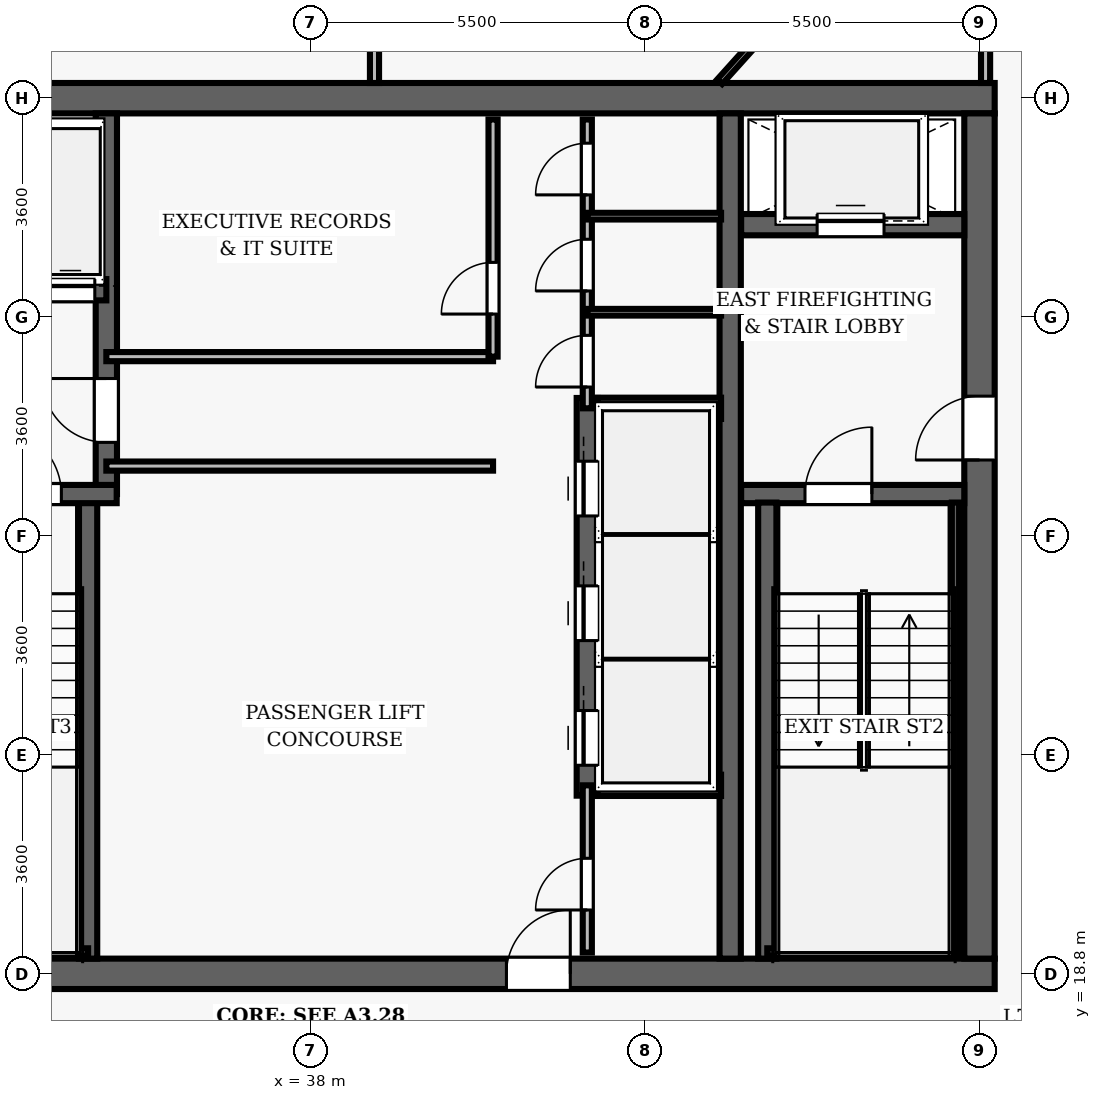
"""IFC4 building model, lengths in metres.
Left out: names, types, materials, properties, quantities, classifications, styles, units other than length and angle.
Written with IfcOpenShell. Run it as: python <this file> out.ifc"""

import sys

from ifc_helpers import new_model, si_unit, direction, frame, frame_2d, origin, place, context, subcontext, project, spatial, rectangle, extrude, element, fill, save


model = new_model("IFC4")
c1 = context("Model", 3, precision=1e-05, world=origin(), true_north=direction((0.0, 1.0)))
c2 = subcontext(c1, "Body", "Model", "MODEL_VIEW")
j1 = project(units=[si_unit("LENGTHUNIT", "METRE"), si_unit("PLANEANGLEUNIT", "RADIAN")], contexts=[c1])
p1 = place(None, origin())
s1 = spatial("IfcSite", under=j1, at=p1, CompositionType="ELEMENT")
p2 = place(p1, origin())
s2 = spatial("IfcBuilding", under=s1, at=p2, CompositionType="ELEMENT")
p3 = place(p2, frame((0.0, 0.0, 280.55)))
s3 = spatial("IfcBuildingStorey", under=s2, at=p3, CompositionType="ELEMENT", Elevation=280.55)
p4 = place(p3, frame((26.75, 18.8, 0.0), z_axis=(0.0, 0.0, 1.0), x_axis=(1.0, 0.0, 0.0)))
e1 = element("IfcWall", 1, at=p4, inside=s3, PredefinedType="SHEAR", context=c2, shape_type="SweptSolid", body=[
    extrude(rectangle(XDim=22.5, YDim=0.5, at=frame_2d((11.25, 0.0))), origin(), (0.0, 0.0, 1.0), 3.85),
])
p5 = place(p4, frame((14.47, 0.0, 0.0)))
e2 = element("IfcOpeningElement", 2, at=p5, cuts=e1, PredefinedType="OPENING", context=c2, shape_type="SweptSolid", body=[
    extrude(rectangle(XDim=1.05, YDim=2.15, at=frame_2d((0.525, 1.075))), frame((0.0, 0.26, 0.0), z_axis=(0.0, -1.0, 0.0), x_axis=(1.0, 0.0, 0.0)), (0.0, 0.0, 1.0), 0.52),
])
p6 = place(p3, frame((26.75, 33.2, 0.0), z_axis=(0.0, 0.0, 1.0), x_axis=(1.0, 0.0, 0.0)))
e3 = element("IfcWall", 3, at=p6, inside=s3, PredefinedType="SHEAR", context=c2, shape_type="SweptSolid", body=[
    extrude(rectangle(XDim=22.5, YDim=0.5, at=frame_2d((11.25, 0.0))), origin(), (0.0, 0.0, 1.0), 3.85),
])
p7 = place(p3, frame((49.0, 19.05, 0.0), z_axis=(0.0, 0.0, 1.0), x_axis=(0.0, 1.0, 0.0)))
e4 = element("IfcWall", 4, at=p7, inside=s3, PredefinedType="SHEAR", context=c2, shape_type="SweptSolid", body=[
    extrude(rectangle(XDim=13.9, YDim=0.5, at=frame_2d((6.95, 0.0))), origin(), (0.0, 0.0, 1.0), 3.85),
])
p8 = place(p7, frame((8.2, 0.0, 0.0)))
e5 = element("IfcOpeningElement", 5, at=p8, cuts=e4, PredefinedType="OPENING", context=c2, shape_type="SweptSolid", body=[
    extrude(rectangle(XDim=1.05, YDim=2.15, at=frame_2d((0.525, 1.075))), frame((0.0, 0.26, 0.0), z_axis=(0.0, -1.0, 0.0), x_axis=(1.0, 0.0, 0.0)), (0.0, 0.0, 1.0), 0.52),
])
p9 = place(p3, frame((44.9, 19.05, 0.0), z_axis=(0.0, 0.0, 1.0), x_axis=(0.0, 1.0, 0.0)))
e6 = element("IfcWall", 6, at=p9, inside=s3, PredefinedType="SHEAR", context=c2, shape_type="SweptSolid", body=[
    extrude(rectangle(XDim=13.9, YDim=0.35, at=frame_2d((6.95, 0.0))), origin(), (0.0, 0.0, 1.0), 3.85),
])
p10 = place(p3, frame((45.08, 26.69, 0.0), z_axis=(0.0, 0.0, 1.0), x_axis=(1.0, 0.0, 0.0)))
e7 = element("IfcWall", 7, at=p10, inside=s3, PredefinedType="SHEAR", context=c2, shape_type="SweptSolid", body=[
    extrude(rectangle(XDim=3.67, YDim=0.3, at=frame_2d((1.835, 0.0))), origin(), (0.0, 0.0, 1.0), 3.85),
])
p11 = place(p10, frame((1.05, 0.0, 0.0)))
e8 = element("IfcOpeningElement", 8, at=p11, cuts=e7, PredefinedType="OPENING", context=c2, shape_type="SweptSolid", body=[
    extrude(rectangle(XDim=1.1, YDim=2.15, at=frame_2d((0.55, 1.075))), frame((0.0, 0.16, 0.0), z_axis=(0.0, -1.0, 0.0), x_axis=(1.0, 0.0, 0.0)), (0.0, 0.0, 1.0), 0.32),
])
p12 = place(p3, frame((45.51, 19.05, 0.0), z_axis=(0.0, 0.0, 1.0), x_axis=(0.0, 1.0, 0.0)))
e9 = element("IfcWall", 9, at=p12, inside=s3, PredefinedType="SHEAR", context=c2, shape_type="SweptSolid", body=[
    extrude(rectangle(XDim=7.5, YDim=0.3, at=frame_2d((3.75, 0.0))), origin(), (0.0, 0.0, 1.0), 3.85),
])
p13 = place(p3, frame((48.605, 19.1, 0.0), z_axis=(0.0, 0.0, 1.0), x_axis=(0.0, 1.0, 0.0)))
e10 = element("IfcWall", 10, at=p13, inside=s3, PredefinedType="SHEAR", context=c2, shape_type="SweptSolid", body=[
    extrude(rectangle(XDim=7.45, YDim=0.12, at=frame_2d((3.725, 0.0))), origin(), (0.0, 0.0, 1.0), 3.85),
])
p14 = place(p3, frame((45.51, 19.16, 0.0), z_axis=(0.0, 0.0, 1.0), x_axis=(1.0, 0.0, 0.0)))
e11 = element("IfcWall", 11, at=p14, inside=s3, PredefinedType="SHEAR", context=c2, shape_type="SweptSolid", body=[
    extrude(rectangle(XDim=3.095, YDim=0.12, at=frame_2d((1.547, 0.0))), origin(), (0.0, 0.0, 1.0), 3.85),
])
p15 = place(p3, frame((45.08, 31.12, 0.0), z_axis=(0.0, 0.0, 1.0), x_axis=(1.0, 0.0, 0.0)))
e12 = element("IfcWall", 12, at=p15, inside=s3, PredefinedType="SHEAR", context=c2, shape_type="SweptSolid", body=[
    extrude(rectangle(XDim=3.67, YDim=0.35, at=frame_2d((1.835, 0.0))), origin(), (0.0, 0.0, 1.0), 3.04),
])
p16 = place(p15, frame((1.25, 0.0, 0.0)))
e13 = element("IfcOpeningElement", 13, at=p16, cuts=e12, PredefinedType="OPENING", context=c2, shape_type="SweptSolid", body=[
    extrude(rectangle(XDim=1.1, YDim=2.15, at=frame_2d((0.55, 1.075))), frame((0.0, 0.185, 0.0), z_axis=(0.0, -1.0, 0.0), x_axis=(1.0, 0.0, 0.0)), (0.0, 0.0, 1.0), 0.37),
])
p17 = place(p3, frame((34.34, 19.05, 0.0), z_axis=(0.0, 0.0, 1.0), x_axis=(0.0, 1.0, 0.0)))
e14 = element("IfcWall", 14, at=p17, inside=s3, PredefinedType="SHEAR", context=c2, shape_type="SweptSolid", body=[
    extrude(rectangle(XDim=7.5, YDim=0.3, at=frame_2d((3.75, 0.0))), origin(), (0.0, 0.0, 1.0), 3.85),
])
p18 = place(p3, frame((34.64, 26.69, 0.0), z_axis=(0.0, 0.0, 1.0), x_axis=(0.0, 1.0, 0.0)))
e15 = element("IfcWall", 15, at=p18, inside=s3, PredefinedType="SHEAR", context=c2, shape_type="SweptSolid", body=[
    extrude(rectangle(XDim=6.26, YDim=0.35, at=frame_2d((3.13, 0.0))), origin(), (0.0, 0.0, 1.0), 3.85),
])
p19 = place(p18, frame((0.85, 0.0, 0.0)))
e16 = element("IfcOpeningElement", 16, at=p19, cuts=e15, PredefinedType="OPENING", context=c2, shape_type="SweptSolid", body=[
    extrude(rectangle(XDim=1.05, YDim=2.15, at=frame_2d((0.525, 1.075))), frame((0.0, 0.185, 0.0), z_axis=(0.0, -1.0, 0.0), x_axis=(1.0, 0.0, 0.0)), (0.0, 0.0, 1.0), 0.37),
])
p20 = place(p3, frame((31.25, 26.69, 0.0), z_axis=(0.0, 0.0, 1.0), x_axis=(1.0, 0.0, 0.0)))
e17 = element("IfcWall", 17, at=p20, inside=s3, PredefinedType="SHEAR", context=c2, shape_type="SweptSolid", body=[
    extrude(rectangle(XDim=3.56, YDim=0.3, at=frame_2d((1.78, 0.0))), origin(), (0.0, 0.0, 1.0), 3.85),
])
p21 = place(p20, frame((1.55, 0.0, 0.0)))
e18 = element("IfcOpeningElement", 18, at=p21, cuts=e17, PredefinedType="OPENING", context=c2, shape_type="SweptSolid", body=[
    extrude(rectangle(XDim=1.1, YDim=2.15, at=frame_2d((0.55, 1.075))), frame((0.0, 0.16, 0.0), z_axis=(0.0, -1.0, 0.0), x_axis=(1.0, 0.0, 0.0)), (0.0, 0.0, 1.0), 0.32),
])
p22 = place(p3, frame((31.3, 19.16, 0.0), z_axis=(0.0, 0.0, 1.0), x_axis=(1.0, 0.0, 0.0)))
e19 = element("IfcWall", 19, at=p22, inside=s3, PredefinedType="SHEAR", context=c2, shape_type="SweptSolid", body=[
    extrude(rectangle(XDim=3.04, YDim=0.12, at=frame_2d((1.52, 0.0))), origin(), (0.0, 0.0, 1.0), 3.85),
])
p23 = place(p3, frame((32.23, 30.05, 0.0), z_axis=(0.0, 0.0, 1.0), x_axis=(1.0, 0.0, 0.0)))
e20 = element("IfcWall", 20, at=p23, inside=s3, PredefinedType="SHEAR", context=c2, shape_type="SweptSolid", body=[
    extrude(rectangle(XDim=2.41, YDim=0.35, at=frame_2d((1.205, 0.0))), origin(), (0.0, 0.0, 1.0), 3.04),
])
p24 = place(p23, frame((0.42, 0.0, 0.0)))
e21 = element("IfcOpeningElement", 21, at=p24, cuts=e20, PredefinedType="OPENING", context=c2, shape_type="SweptSolid", body=[
    extrude(rectangle(XDim=0.8, YDim=2.15, at=frame_2d((0.4, 1.075))), frame((0.0, 0.185, 0.0), z_axis=(0.0, -1.0, 0.0), x_axis=(1.0, 0.0, 0.0)), (0.0, 0.0, 1.0), 0.37),
])
p25 = place(p23, frame((1.42, 0.0, 0.0)))
e22 = element("IfcOpeningElement", 22, at=p25, cuts=e20, PredefinedType="OPENING", context=c2, shape_type="SweptSolid", body=[
    extrude(rectangle(XDim=0.8, YDim=2.15, at=frame_2d((0.4, 1.075))), frame((0.0, 0.185, 0.0), z_axis=(0.0, -1.0, 0.0), x_axis=(1.0, 0.0, 0.0)), (0.0, 0.0, 1.0), 0.37),
])
p26 = place(p3, frame((42.55, 21.73, 0.0), z_axis=(0.0, 0.0, 1.0), x_axis=(0.0, 1.0, 0.0)))
e23 = element("IfcWall", 23, at=p26, inside=s3, PredefinedType="SHEAR", context=c2, shape_type="SweptSolid", body=[
    extrude(rectangle(XDim=6.54, YDim=0.35, at=frame_2d((3.27, 0.0))), origin(), (0.0, 0.0, 1.0), 3.04),
])
p27 = place(p26, frame((0.5, 0.0, 0.0)))
e24 = element("IfcOpeningElement", 24, at=p27, cuts=e23, PredefinedType="OPENING", context=c2, shape_type="SweptSolid", body=[
    extrude(rectangle(XDim=0.9, YDim=2.15, at=frame_2d((0.45, 1.075))), frame((0.0, 0.185, 0.0), z_axis=(0.0, -1.0, 0.0), x_axis=(1.0, 0.0, 0.0)), (0.0, 0.0, 1.0), 0.37),
])
p28 = place(p26, frame((2.55, 0.0, 0.0)))
e25 = element("IfcOpeningElement", 25, at=p28, cuts=e23, PredefinedType="OPENING", context=c2, shape_type="SweptSolid", body=[
    extrude(rectangle(XDim=0.9, YDim=2.15, at=frame_2d((0.45, 1.075))), frame((0.0, 0.185, 0.0), z_axis=(0.0, -1.0, 0.0), x_axis=(1.0, 0.0, 0.0)), (0.0, 0.0, 1.0), 0.37),
])
p29 = place(p26, frame((4.6, 0.0, 0.0)))
e26 = element("IfcOpeningElement", 26, at=p29, cuts=e23, PredefinedType="OPENING", context=c2, shape_type="SweptSolid", body=[
    extrude(rectangle(XDim=0.9, YDim=2.15, at=frame_2d((0.45, 1.075))), frame((0.0, 0.185, 0.0), z_axis=(0.0, -1.0, 0.0), x_axis=(1.0, 0.0, 0.0)), (0.0, 0.0, 1.0), 0.37),
])
for number, where, z_axis, x_axis in (
    (27, (42.72, 21.9, 0.0), (0.0, 0.0, 1.0), (1.0, 0.0, 0.0)),
    (28, (42.72, 28.1, 0.0), (0.0, 0.0, 1.0), (1.0, 0.0, 0.0)),
):
    element("IfcWall", number, at=place(p3, frame(where, z_axis=z_axis, x_axis=x_axis)), inside=s3, PredefinedType="SHEAR", context=c2, shape_type="SweptSolid", body=[
        extrude(rectangle(XDim=2.03, YDim=0.35, at=frame_2d((1.015, 0.0))), origin(), (0.0, 0.0, 1.0), 3.04),
    ])
for number, where, z_axis, x_axis in (
    (29, (34.64, 27.15, 0.0), (0.0, 0.0, 1.0), (1.0, 0.0, 0.0)),
    (30, (34.64, 28.95, 0.0), (0.0, 0.0, 1.0), (1.0, 0.0, 0.0)),
):
    element("IfcWall", number, at=place(p3, frame(where, z_axis=z_axis, x_axis=x_axis)), inside=s3, PredefinedType="PARTITIONING", context=c2, shape_type="SweptSolid", body=[
        extrude(rectangle(XDim=6.36, YDim=0.15, at=frame_2d((3.18, 0.0))), origin(), (0.0, 0.0, 1.0), 3.04),
    ])
p30 = place(p3, frame((41.0, 28.95, 0.0), z_axis=(0.0, 0.0, 1.0), x_axis=(0.0, 1.0, 0.0)))
e31 = element("IfcWall", 31, at=p30, inside=s3, PredefinedType="PARTITIONING", context=c2, shape_type="SweptSolid", body=[
    extrude(rectangle(XDim=3.9, YDim=0.15, at=frame_2d((1.95, 0.0))), origin(), (0.0, 0.0, 1.0), 3.04),
])
p31 = place(p30, frame((0.7, 0.0, 0.0)))
e32 = element("IfcOpeningElement", 32, at=p31, cuts=e31, PredefinedType="OPENING", context=c2, shape_type="SweptSolid", body=[
    extrude(rectangle(XDim=0.85, YDim=2.1, at=frame_2d((0.425, 1.05))), frame((0.0, 0.085, 0.0), z_axis=(0.0, -1.0, 0.0), x_axis=(1.0, 0.0, 0.0)), (0.0, 0.0, 1.0), 0.17),
])
p32 = place(p3, frame((42.55, 28.1, 0.0), z_axis=(0.0, 0.0, 1.0), x_axis=(0.0, 1.0, 0.0)))
e33 = element("IfcWall", 33, at=p32, inside=s3, PredefinedType="PARTITIONING", context=c2, shape_type="SweptSolid", body=[
    extrude(rectangle(XDim=4.75, YDim=0.15, at=frame_2d((2.375, 0.0))), origin(), (0.0, 0.0, 1.0), 3.04),
])
p33 = place(p32, frame((0.35, 0.0, 0.0)))
e34 = element("IfcOpeningElement", 34, at=p33, cuts=e33, PredefinedType="OPENING", context=c2, shape_type="SweptSolid", body=[
    extrude(rectangle(XDim=0.85, YDim=2.1, at=frame_2d((0.425, 1.05))), frame((0.0, 0.085, 0.0), z_axis=(0.0, -1.0, 0.0), x_axis=(1.0, 0.0, 0.0)), (0.0, 0.0, 1.0), 0.17),
])
p34 = place(p32, frame((1.93, 0.0, 0.0)))
e35 = element("IfcOpeningElement", 35, at=p34, cuts=e33, PredefinedType="OPENING", context=c2, shape_type="SweptSolid", body=[
    extrude(rectangle(XDim=0.85, YDim=2.1, at=frame_2d((0.425, 1.05))), frame((0.0, 0.085, 0.0), z_axis=(0.0, -1.0, 0.0), x_axis=(1.0, 0.0, 0.0)), (0.0, 0.0, 1.0), 0.17),
])
p35 = place(p32, frame((3.51, 0.0, 0.0)))
e36 = element("IfcOpeningElement", 36, at=p35, cuts=e33, PredefinedType="OPENING", context=c2, shape_type="SweptSolid", body=[
    extrude(rectangle(XDim=0.85, YDim=2.1, at=frame_2d((0.425, 1.05))), frame((0.0, 0.085, 0.0), z_axis=(0.0, -1.0, 0.0), x_axis=(1.0, 0.0, 0.0)), (0.0, 0.0, 1.0), 0.17),
])
for number, where, z_axis, x_axis in (
    (37, (42.55, 29.68, 0.0), (0.0, 0.0, 1.0), (1.0, 0.0, 0.0)),
    (38, (42.55, 31.26, 0.0), (0.0, 0.0, 1.0), (1.0, 0.0, 0.0)),
):
    element("IfcWall", number, at=place(p3, frame(where, z_axis=z_axis, x_axis=x_axis)), inside=s3, PredefinedType="PARTITIONING", context=c2, shape_type="SweptSolid", body=[
        extrude(rectangle(XDim=2.2, YDim=0.11, at=frame_2d((1.1, 0.0))), origin(), (0.0, 0.0, 1.0), 3.04),
    ])
p36 = place(p3, frame((42.55, 19.15, 0.0), z_axis=(0.0, 0.0, 1.0), x_axis=(0.0, 1.0, 0.0)))
e39 = element("IfcWall", 39, at=p36, inside=s3, PredefinedType="PARTITIONING", context=c2, shape_type="SweptSolid", body=[
    extrude(rectangle(XDim=2.75, YDim=0.15, at=frame_2d((1.375, 0.0))), origin(), (0.0, 0.0, 1.0), 3.04),
])
p37 = place(p36, frame((0.7, 0.0, 0.0)))
e40 = element("IfcOpeningElement", 40, at=p37, cuts=e39, PredefinedType="OPENING", context=c2, shape_type="SweptSolid", body=[
    extrude(rectangle(XDim=0.85, YDim=2.1, at=frame_2d((0.425, 1.05))), frame((0.0, 0.085, 0.0), z_axis=(0.0, -1.0, 0.0), x_axis=(1.0, 0.0, 0.0)), (0.0, 0.0, 1.0), 0.17),
])
p38 = place(p3, frame((49.1, 33.45, 0.0), z_axis=(0.0, 0.0, 1.0), x_axis=(0.0, 1.0, 0.0)))
e41 = element("IfcWall", 41, at=p38, inside=s3, PredefinedType="PARTITIONING", context=c2, shape_type="SweptSolid", body=[
    extrude(rectangle(XDim=7.323, YDim=0.15, at=frame_2d((3.662, 0.0))), origin(), (0.0, 0.0, 1.0), 3.04),
])
p39 = place(p3, frame((39.05, 33.45, 0.0), z_axis=(0.0, 0.0, 1.0), x_axis=(0.0, 1.0, 0.0)))
e42 = element("IfcWall", 42, at=p39, inside=s3, PredefinedType="PARTITIONING", context=c2, shape_type="SweptSolid", body=[
    extrude(rectangle(XDim=6.95, YDim=0.15, at=frame_2d((3.475, 0.0))), origin(), (0.0, 0.0, 1.0), 3.04),
])
p40 = place(p39, frame((0.988, 0.0, 0.0)))
e43 = element("IfcOpeningElement", 43, at=p40, cuts=e42, PredefinedType="OPENING", context=c2, shape_type="SweptSolid", body=[
    extrude(rectangle(XDim=1.5, YDim=2.2, at=frame_2d((0.75, 1.1))), frame((0.0, 0.085, 0.0), z_axis=(0.0, -1.0, 0.0), x_axis=(1.0, 0.0, 0.0)), (0.0, 0.0, 1.0), 0.17),
])
p41 = place(p3, frame((44.726, 33.47, 0.0), z_axis=(0.0, 0.0, 1.0), x_axis=(0.669116067624, 0.743157915956, 0.0)))
e44 = element("IfcWall", 44, at=p41, inside=s3, PredefinedType="PARTITIONING", context=c2, shape_type="SweptSolid", body=[
    extrude(rectangle(XDim=6.328, YDim=0.11, at=frame_2d((3.164, 0.0))), origin(), (0.0, 0.0, 1.0), 3.04),
])
p42 = place(p11, origin())
e45 = element("IfcDoor", 45, at=p42, inside=s3, OperationType="SINGLE_SWING_RIGHT", PredefinedType="DOOR", context=c2, shape_type="SweptSolid", body=[
    extrude(rectangle(XDim=1.1, YDim=2.15, at=frame_2d((0.55, 1.075))), frame((0.0, 0.025, 0.0), z_axis=(0.0, -1.0, 0.0), x_axis=(1.0, 0.0, 0.0)), (0.0, 0.0, 1.0), 0.05),
])
fill(e8, e45)
p43 = place(p8, origin())
e46 = element("IfcDoor", 46, at=p43, inside=s3, OperationType="SINGLE_SWING_LEFT", PredefinedType="DOOR", context=c2, shape_type="SweptSolid", body=[
    extrude(rectangle(XDim=1.05, YDim=2.15, at=frame_2d((0.525, 1.075))), frame((0.0, 0.025, 0.0), z_axis=(0.0, -1.0, 0.0), x_axis=(1.0, 0.0, 0.0)), (0.0, 0.0, 1.0), 0.05),
])
fill(e5, e46)
p44 = place(p21, origin())
e47 = element("IfcDoor", 47, at=p44, inside=s3, OperationType="SINGLE_SWING_LEFT", PredefinedType="DOOR", context=c2, shape_type="SweptSolid", body=[
    extrude(rectangle(XDim=1.1, YDim=2.15, at=frame_2d((0.55, 1.075))), frame((0.0, 0.025, 0.0), z_axis=(0.0, -1.0, 0.0), x_axis=(1.0, 0.0, 0.0)), (0.0, 0.0, 1.0), 0.05),
])
fill(e18, e47)
p45 = place(p5, origin())
e48 = element("IfcDoor", 48, at=p45, inside=s3, OperationType="SINGLE_SWING_RIGHT", PredefinedType="DOOR", context=c2, shape_type="SweptSolid", body=[
    extrude(rectangle(XDim=1.05, YDim=2.15, at=frame_2d((0.525, 1.075))), frame((0.0, 0.025, 0.0), z_axis=(0.0, -1.0, 0.0), x_axis=(1.0, 0.0, 0.0)), (0.0, 0.0, 1.0), 0.05),
])
fill(e2, e48)
p46 = place(p19, origin())
e49 = element("IfcDoor", 49, at=p46, inside=s3, OperationType="SINGLE_SWING_RIGHT", PredefinedType="DOOR", context=c2, shape_type="SweptSolid", body=[
    extrude(rectangle(XDim=1.05, YDim=2.15, at=frame_2d((0.525, 1.075))), frame((0.0, 0.025, 0.0), z_axis=(0.0, -1.0, 0.0), x_axis=(1.0, 0.0, 0.0)), (0.0, 0.0, 1.0), 0.05),
])
fill(e16, e49)
p47 = place(p31, origin())
e50 = element("IfcDoor", 50, at=p47, inside=s3, OperationType="SINGLE_SWING_LEFT", PredefinedType="DOOR", context=c2, shape_type="SweptSolid", body=[
    extrude(rectangle(XDim=0.85, YDim=2.1, at=frame_2d((0.425, 1.05))), frame((0.0, 0.025, 0.0), z_axis=(0.0, -1.0, 0.0), x_axis=(1.0, 0.0, 0.0)), (0.0, 0.0, 1.0), 0.05),
])
fill(e32, e50)
p48 = place(p33, origin())
e51 = element("IfcDoor", 51, at=p48, inside=s3, OperationType="SINGLE_SWING_LEFT", PredefinedType="DOOR", context=c2, shape_type="SweptSolid", body=[
    extrude(rectangle(XDim=0.85, YDim=2.1, at=frame_2d((0.425, 1.05))), frame((0.0, 0.025, 0.0), z_axis=(0.0, -1.0, 0.0), x_axis=(1.0, 0.0, 0.0)), (0.0, 0.0, 1.0), 0.05),
])
fill(e34, e51)
p49 = place(p34, origin())
e52 = element("IfcDoor", 52, at=p49, inside=s3, OperationType="SINGLE_SWING_LEFT", PredefinedType="DOOR", context=c2, shape_type="SweptSolid", body=[
    extrude(rectangle(XDim=0.85, YDim=2.1, at=frame_2d((0.425, 1.05))), frame((0.0, 0.025, 0.0), z_axis=(0.0, -1.0, 0.0), x_axis=(1.0, 0.0, 0.0)), (0.0, 0.0, 1.0), 0.05),
])
fill(e35, e52)
p50 = place(p35, origin())
e53 = element("IfcDoor", 53, at=p50, inside=s3, OperationType="SINGLE_SWING_LEFT", PredefinedType="DOOR", context=c2, shape_type="SweptSolid", body=[
    extrude(rectangle(XDim=0.85, YDim=2.1, at=frame_2d((0.425, 1.05))), frame((0.0, 0.025, 0.0), z_axis=(0.0, -1.0, 0.0), x_axis=(1.0, 0.0, 0.0)), (0.0, 0.0, 1.0), 0.05),
])
fill(e36, e53)
p51 = place(p37, origin())
e54 = element("IfcDoor", 54, at=p51, inside=s3, OperationType="SINGLE_SWING_LEFT", PredefinedType="DOOR", context=c2, shape_type="SweptSolid", body=[
    extrude(rectangle(XDim=0.85, YDim=2.1, at=frame_2d((0.425, 1.05))), frame((0.0, 0.025, 0.0), z_axis=(0.0, -1.0, 0.0), x_axis=(1.0, 0.0, 0.0)), (0.0, 0.0, 1.0), 0.05),
])
fill(e40, e54)
p52 = place(p27, origin())
e55 = element("IfcDoor", 55, at=p52, inside=s3, OperationType="SLIDING_TO_LEFT", PredefinedType="DOOR", context=c2, shape_type="SweptSolid", body=[
    extrude(rectangle(XDim=0.9, YDim=2.15, at=frame_2d((0.45, 1.075))), frame((0.0, 0.025, 0.0), z_axis=(0.0, -1.0, 0.0), x_axis=(1.0, 0.0, 0.0)), (0.0, 0.0, 1.0), 0.05),
])
fill(e24, e55)
p53 = place(p28, origin())
e56 = element("IfcDoor", 56, at=p53, inside=s3, OperationType="SLIDING_TO_LEFT", PredefinedType="DOOR", context=c2, shape_type="SweptSolid", body=[
    extrude(rectangle(XDim=0.9, YDim=2.15, at=frame_2d((0.45, 1.075))), frame((0.0, 0.025, 0.0), z_axis=(0.0, -1.0, 0.0), x_axis=(1.0, 0.0, 0.0)), (0.0, 0.0, 1.0), 0.05),
])
fill(e25, e56)
p54 = place(p29, origin())
e57 = element("IfcDoor", 57, at=p54, inside=s3, OperationType="SLIDING_TO_LEFT", PredefinedType="DOOR", context=c2, shape_type="SweptSolid", body=[
    extrude(rectangle(XDim=0.9, YDim=2.15, at=frame_2d((0.45, 1.075))), frame((0.0, 0.025, 0.0), z_axis=(0.0, -1.0, 0.0), x_axis=(1.0, 0.0, 0.0)), (0.0, 0.0, 1.0), 0.05),
])
fill(e26, e57)
p55 = place(p16, origin())
e58 = element("IfcDoor", 58, at=p55, inside=s3, OperationType="SLIDING_TO_LEFT", PredefinedType="DOOR", context=c2, shape_type="SweptSolid", body=[
    extrude(rectangle(XDim=1.1, YDim=2.15, at=frame_2d((0.55, 1.075))), frame((0.0, 0.025, 0.0), z_axis=(0.0, -1.0, 0.0), x_axis=(1.0, 0.0, 0.0)), (0.0, 0.0, 1.0), 0.05),
])
fill(e13, e58)
p56 = place(p25, origin())
e59 = element("IfcDoor", 59, at=p56, inside=s3, OperationType="SLIDING_TO_LEFT", PredefinedType="DOOR", context=c2, shape_type="SweptSolid", body=[
    extrude(rectangle(XDim=0.8, YDim=2.15, at=frame_2d((0.4, 1.075))), frame((0.0, 0.025, 0.0), z_axis=(0.0, -1.0, 0.0), x_axis=(1.0, 0.0, 0.0)), (0.0, 0.0, 1.0), 0.05),
])
fill(e22, e59)
save(model, sys.argv[1])
